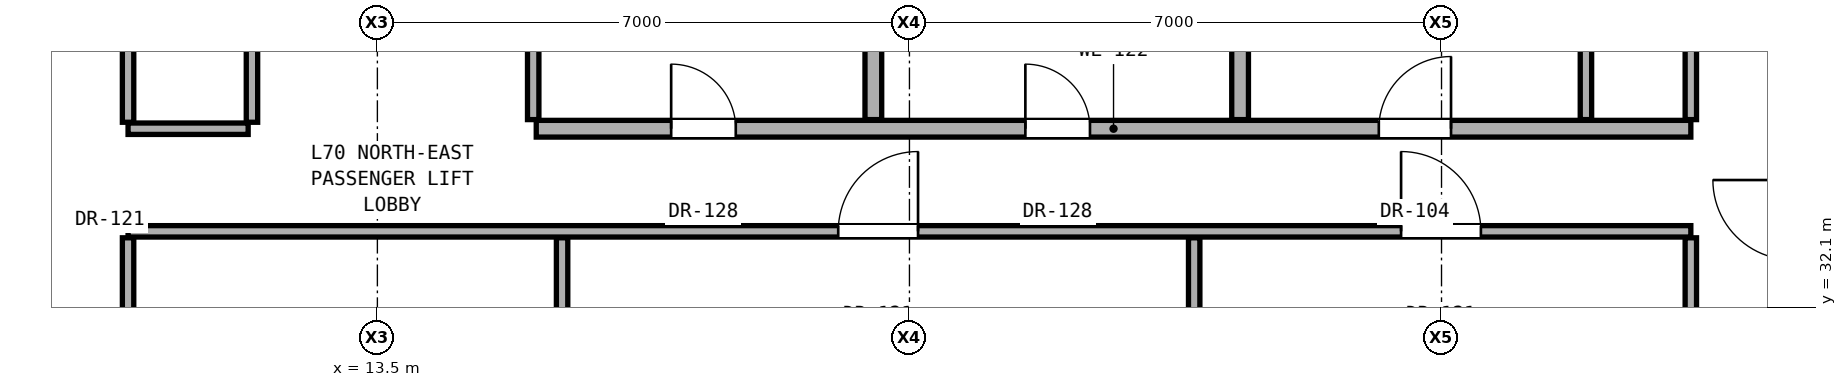
"""IFC4 building model, lengths in metres.
Left out: names, types, materials, properties, quantities, classifications, styles, units other than length and angle.
Written with IfcOpenShell. Run it as: python <this file> out.ifc"""

import sys

from ifc_helpers import new_model, si_unit, direction, frame, frame_2d, origin, place, context, subcontext, project, spatial, rectangle, extrude, element, fill, save


model = new_model("IFC4")
c1 = context("Model", 3, precision=1e-05, world=origin(), true_north=direction((0.0, 1.0)))
c2 = subcontext(c1, "Body", "Model", "MODEL_VIEW")
j1 = project(units=[si_unit("LENGTHUNIT", "METRE"), si_unit("PLANEANGLEUNIT", "RADIAN")], contexts=[c1])
p1 = place(None, origin())
s1 = spatial("IfcSite", under=j1, at=p1, CompositionType="ELEMENT")
p2 = place(p1, origin())
s2 = spatial("IfcBuilding", under=s1, at=p2, CompositionType="ELEMENT")
p3 = place(p2, frame((0.0, 0.0, 245.8)))
s3 = spatial("IfcBuildingStorey", under=s2, at=p3, CompositionType="ELEMENT", Elevation=245.8)
p4 = place(p3, frame((10.22, 33.1, 0.0), z_axis=(0.0, 0.0, 1.0), x_axis=(1.0, 0.0, 0.0)))
e1 = element("IfcWall", 1, at=p4, inside=s3, PredefinedType="PARTITIONING", context=c2, shape_type="SweptSolid", body=[
    extrude(rectangle(XDim=20.56, YDim=0.15, at=frame_2d((10.28, 0.0))), origin(), (0.0, 0.0, 1.0), 2.236),
])
p5 = place(p4, frame((9.343, 0.0, 0.0)))
e2 = element("IfcOpeningElement", 2, at=p5, cuts=e1, PredefinedType="OPENING", context=c2, shape_type="SweptSolid", body=[
    extrude(rectangle(XDim=1.05, YDim=2.2, at=frame_2d((0.525, 1.1))), frame((0.0, 0.085, 0.0), z_axis=(0.0, -1.0, 0.0), x_axis=(1.0, 0.0, 0.0)), (0.0, 0.0, 1.0), 0.17),
])
p6 = place(p4, frame((16.748, 0.0, 0.0)))
e3 = element("IfcOpeningElement", 3, at=p6, cuts=e1, PredefinedType="OPENING", context=c2, shape_type="SweptSolid", body=[
    extrude(rectangle(XDim=1.05, YDim=2.2, at=frame_2d((0.525, 1.1))), frame((0.0, 0.085, 0.0), z_axis=(0.0, -1.0, 0.0), x_axis=(1.0, 0.0, 0.0)), (0.0, 0.0, 1.0), 0.17),
])
p7 = place(p3, frame((10.22, 34.45, 0.0), z_axis=(0.0, 0.0, 1.0), x_axis=(1.0, 0.0, 0.0)))
e4 = element("IfcWall", 4, at=p7, inside=s3, PredefinedType="PARTITIONING", context=c2, shape_type="SweptSolid", body=[
    extrude(rectangle(XDim=1.58, YDim=0.15, at=frame_2d((0.79, 0.0))), origin(), (0.0, 0.0, 1.0), 2.236),
])
p8 = place(p3, frame((15.59, 34.45, 0.0), z_axis=(0.0, 0.0, 1.0), x_axis=(1.0, 0.0, 0.0)))
e5 = element("IfcWall", 5, at=p8, inside=s3, PredefinedType="SOLIDWALL", context=c2, shape_type="SweptSolid", body=[
    extrude(rectangle(XDim=15.19, YDim=0.22, at=frame_2d((7.595, 0.0))), origin(), (0.0, 0.0, 1.0), 2.236),
])
p9 = place(p8, frame((6.435, 0.0, 0.0)))
e6 = element("IfcOpeningElement", 6, at=p9, cuts=e5, PredefinedType="OPENING", context=c2, shape_type="SweptSolid", body=[
    extrude(rectangle(XDim=0.85, YDim=2.01, at=frame_2d((0.425, 1.005))), frame((0.0, 0.12, 0.0), z_axis=(0.0, -1.0, 0.0), x_axis=(1.0, 0.0, 0.0)), (0.0, 0.0, 1.0), 0.24),
])
p10 = place(p8, frame((11.085, 0.0, 0.0)))
e7 = element("IfcOpeningElement", 7, at=p10, cuts=e5, PredefinedType="OPENING", context=c2, shape_type="SweptSolid", body=[
    extrude(rectangle(XDim=0.95, YDim=2.15, at=frame_2d((0.475, 1.075))), frame((0.0, 0.12, 0.0), z_axis=(0.0, -1.0, 0.0), x_axis=(1.0, 0.0, 0.0)), (0.0, 0.0, 1.0), 0.24),
])
p11 = place(p8, frame((1.775, 0.0, 0.0)))
e8 = element("IfcOpeningElement", 8, at=p11, cuts=e5, PredefinedType="OPENING", context=c2, shape_type="SweptSolid", body=[
    extrude(rectangle(XDim=0.85, YDim=2.01, at=frame_2d((0.425, 1.005))), frame((0.0, 0.12, 0.0), z_axis=(0.0, -1.0, 0.0), x_axis=(1.0, 0.0, 0.0)), (0.0, 0.0, 1.0), 0.24),
])
p12 = place(p3, frame((10.22, 22.935, 0.0), z_axis=(0.0, 0.0, 1.0), x_axis=(0.0, 1.0, 0.0)))
e9 = element("IfcWall", 9, at=p12, inside=s3, PredefinedType="PARTITIONING", context=c2, shape_type="SweptSolid", body=[
    extrude(rectangle(XDim=10.08, YDim=0.15, at=frame_2d((5.04, 0.0))), origin(), (0.0, 0.0, 1.0), 2.396),
])
p13 = place(p12, frame((4.565, 0.0, 0.0)))
e10 = element("IfcOpeningElement", 10, at=p13, cuts=e9, PredefinedType="OPENING", context=c2, shape_type="SweptSolid", body=[
    extrude(rectangle(XDim=0.95, YDim=2.15, at=frame_2d((0.475, 1.075))), frame((0.0, 0.085, 0.0), z_axis=(0.0, -1.0, 0.0), x_axis=(1.0, 0.0, 0.0)), (0.0, 0.0, 1.0), 0.17),
])
p14 = place(p3, frame((10.22, 34.535, 0.0), z_axis=(0.0, 0.0, 1.0), x_axis=(0.0, 1.0, 0.0)))
e11 = element("IfcWall", 11, at=p14, inside=s3, PredefinedType="PARTITIONING", context=c2, shape_type="SweptSolid", body=[
    extrude(rectangle(XDim=9.13, YDim=0.15, at=frame_2d((4.565, 0.0))), origin(), (0.0, 0.0, 1.0), 2.492),
])
p15 = place(p3, frame((11.85, 34.535, 0.0), z_axis=(0.0, 0.0, 1.0), x_axis=(0.0, 1.0, 0.0)))
e12 = element("IfcWall", 12, at=p15, inside=s3, PredefinedType="PARTITIONING", context=c2, shape_type="SweptSolid", body=[
    extrude(rectangle(XDim=2.845, YDim=0.15, at=frame_2d((1.422, 0.0))), origin(), (0.0, 0.0, 1.0), 3.1),
])
p16 = place(p3, frame((15.55, 34.57, 0.0), z_axis=(0.0, 0.0, 1.0), x_axis=(0.0, 1.0, 0.0)))
e13 = element("IfcWall", 13, at=p16, inside=s3, PredefinedType="PARTITIONING", context=c2, shape_type="SweptSolid", body=[
    extrude(rectangle(XDim=2.81, YDim=0.15, at=frame_2d((1.405, 0.0))), origin(), (0.0, 0.0, 1.0), 3.1),
])
p17 = place(p3, frame((15.93, 25.925, 0.0), z_axis=(0.0, 0.0, 1.0), x_axis=(0.0, 1.0, 0.0)))
e14 = element("IfcWall", 14, at=p17, inside=s3, PredefinedType="PARTITIONING", context=c2, shape_type="SweptSolid", body=[
    extrude(rectangle(XDim=7.09, YDim=0.15, at=frame_2d((3.545, 0.0))), origin(), (0.0, 0.0, 1.0), 2.236),
])
p18 = place(p3, frame((20.025, 34.57, 0.0), z_axis=(0.0, 0.0, 1.0), x_axis=(0.0, 1.0, 0.0)))
e15 = element("IfcWall", 15, at=p18, inside=s3, PredefinedType="SOLIDWALL", context=c2, shape_type="SweptSolid", body=[
    extrude(rectangle(XDim=2.81, YDim=0.22, at=frame_2d((1.405, 0.0))), origin(), (0.0, 0.0, 1.0), 3.1),
])
p19 = place(p3, frame((24.246, 25.925, 0.0), z_axis=(0.0, 0.0, 1.0), x_axis=(0.0, 1.0, 0.0)))
e16 = element("IfcWall", 16, at=p19, inside=s3, PredefinedType="PARTITIONING", context=c2, shape_type="SweptSolid", body=[
    extrude(rectangle(XDim=7.09, YDim=0.15, at=frame_2d((3.545, 0.0))), origin(), (0.0, 0.0, 1.0), 2.236),
])
p20 = place(p3, frame((24.85, 34.57, 0.0), z_axis=(0.0, 0.0, 1.0), x_axis=(0.0, 1.0, 0.0)))
e17 = element("IfcWall", 17, at=p20, inside=s3, PredefinedType="SOLIDWALL", context=c2, shape_type="SweptSolid", body=[
    extrude(rectangle(XDim=2.81, YDim=0.22, at=frame_2d((1.405, 0.0))), origin(), (0.0, 0.0, 1.0), 3.1),
])
p21 = place(p3, frame((29.4, 34.57, 0.0), z_axis=(0.0, 0.0, 1.0), x_axis=(0.0, 1.0, 0.0)))
e18 = element("IfcWall", 18, at=p21, inside=s3, PredefinedType="PARTITIONING", context=c2, shape_type="SweptSolid", body=[
    extrude(rectangle(XDim=2.81, YDim=0.15, at=frame_2d((1.405, 0.0))), origin(), (0.0, 0.0, 1.0), 3.1),
])
p22 = place(p3, frame((30.78, 25.925, 0.0), z_axis=(0.0, 0.0, 1.0), x_axis=(0.0, 1.0, 0.0)))
e19 = element("IfcWall", 19, at=p22, inside=s3, PredefinedType="PARTITIONING", context=c2, shape_type="SweptSolid", body=[
    extrude(rectangle(XDim=7.09, YDim=0.15, at=frame_2d((3.545, 0.0))), origin(), (0.0, 0.0, 1.0), 2.396),
])
p23 = place(p3, frame((30.78, 34.57, 0.0), z_axis=(0.0, 0.0, 1.0), x_axis=(0.0, 1.0, 0.0)))
e20 = element("IfcWall", 20, at=p23, inside=s3, PredefinedType="PARTITIONING", context=c2, shape_type="SweptSolid", body=[
    extrude(rectangle(XDim=9.095, YDim=0.15, at=frame_2d((4.547, 0.0))), origin(), (0.0, 0.0, 1.0), 2.492),
])
p24 = place(p9, origin())
e21 = element("IfcDoor", 21, at=p24, inside=s3, OperationType="SINGLE_SWING_LEFT", PredefinedType="DOOR", context=c2, shape_type="SweptSolid", body=[
    extrude(rectangle(XDim=0.85, YDim=2.01, at=frame_2d((0.425, 1.005))), frame((0.0, 0.025, 0.0), z_axis=(0.0, -1.0, 0.0), x_axis=(1.0, 0.0, 0.0)), (0.0, 0.0, 1.0), 0.05),
])
fill(e6, e21)
p25 = place(p10, origin())
e22 = element("IfcDoor", 22, at=p25, inside=s3, OperationType="SINGLE_SWING_RIGHT", PredefinedType="DOOR", context=c2, shape_type="SweptSolid", body=[
    extrude(rectangle(XDim=0.95, YDim=2.15, at=frame_2d((0.475, 1.075))), frame((0.0, 0.025, 0.0), z_axis=(0.0, -1.0, 0.0), x_axis=(1.0, 0.0, 0.0)), (0.0, 0.0, 1.0), 0.05),
])
fill(e7, e22)
p26 = place(p11, origin())
e23 = element("IfcDoor", 23, at=p26, inside=s3, OperationType="SINGLE_SWING_LEFT", PredefinedType="DOOR", context=c2, shape_type="SweptSolid", body=[
    extrude(rectangle(XDim=0.85, YDim=2.01, at=frame_2d((0.425, 1.005))), frame((0.0, 0.025, 0.0), z_axis=(0.0, -1.0, 0.0), x_axis=(1.0, 0.0, 0.0)), (0.0, 0.0, 1.0), 0.05),
])
fill(e8, e23)
p27 = place(p5, origin())
e24 = element("IfcDoor", 24, at=p27, inside=s3, OperationType="SINGLE_SWING_RIGHT", PredefinedType="DOOR", context=c2, shape_type="SweptSolid", body=[
    extrude(rectangle(XDim=1.05, YDim=2.2, at=frame_2d((0.525, 1.1))), frame((0.0, 0.025, 0.0), z_axis=(0.0, -1.0, 0.0), x_axis=(1.0, 0.0, 0.0)), (0.0, 0.0, 1.0), 0.05),
])
fill(e2, e24)
p28 = place(p6, origin())
e25 = element("IfcDoor", 25, at=p28, inside=s3, OperationType="SINGLE_SWING_LEFT", PredefinedType="DOOR", context=c2, shape_type="SweptSolid", body=[
    extrude(rectangle(XDim=1.05, YDim=2.2, at=frame_2d((0.525, 1.1))), frame((0.0, 0.025, 0.0), z_axis=(0.0, -1.0, 0.0), x_axis=(1.0, 0.0, 0.0)), (0.0, 0.0, 1.0), 0.05),
])
fill(e3, e25)
save(model, sys.argv[1])
